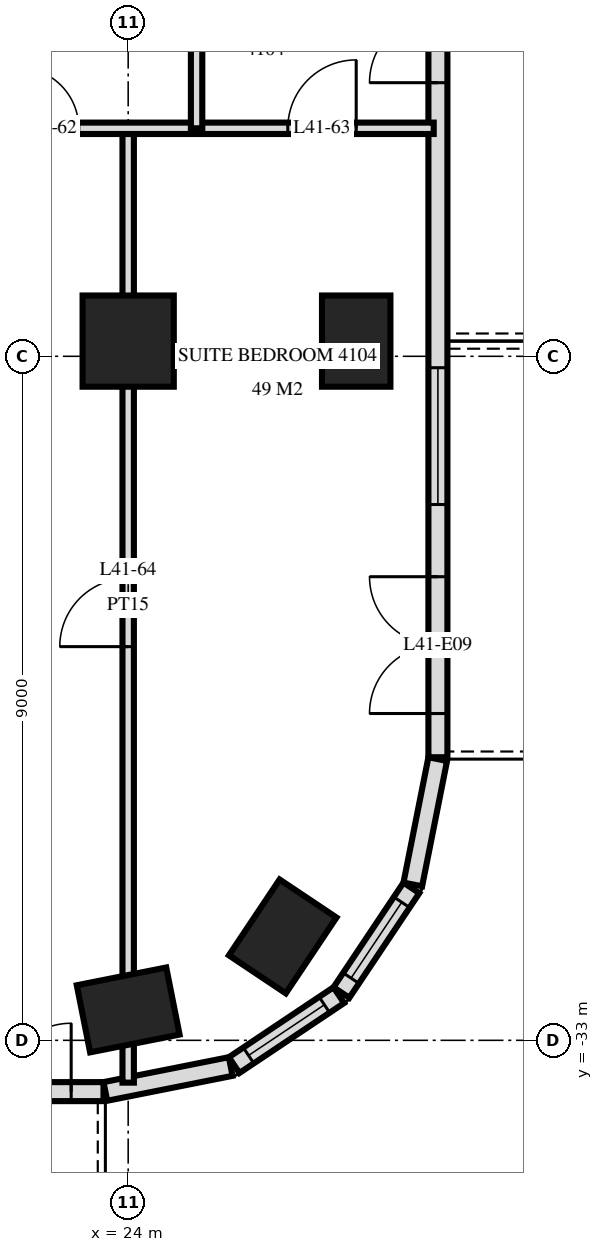
"""IFC4 building model, lengths in metres.
Left out: names, types, materials, properties, quantities, classifications, styles, units other than length and angle.
Written with IfcOpenShell. Run it as: python <this file> out.ifc"""

import sys

from ifc_helpers import new_model, si_unit, direction, frame, frame_2d, origin, origin_2d, place, context, subcontext, project, spatial, rectangle, extrude, element, fill, save


model = new_model("IFC4")
c1 = context("Model", 3, precision=1e-05, world=origin(), true_north=direction((0.0, 1.0)))
c2 = subcontext(c1, "Body", "Model", "MODEL_VIEW")
j1 = project(units=[si_unit("LENGTHUNIT", "METRE"), si_unit("PLANEANGLEUNIT", "RADIAN")], contexts=[c1])
p1 = place(None, origin())
s1 = spatial("IfcSite", under=j1, at=p1, CompositionType="ELEMENT")
p2 = place(p1, origin())
s2 = spatial("IfcBuilding", under=s1, at=p2, CompositionType="ELEMENT")
p3 = place(p2, frame((0.0, 0.0, 159.6)))
s3 = spatial("IfcBuildingStorey", under=s2, at=p3, CompositionType="ELEMENT", Elevation=159.6)
p4 = place(p3, frame((24.0, -32.6, 0.0), z_axis=(0.0, 0.0, 1.0), x_axis=(0.980792089743, 0.195056086032, 0.0)))
e1 = element("IfcColumn", 1, at=p4, inside=s3, PredefinedType="COLUMN", context=c2, shape_type="SweptSolid", body=[
    extrude(rectangle(XDim=1.2, YDim=0.9, at=origin_2d()), origin(), (0.0, 0.0, 1.0), 3.6),
])
p5 = place(p3, frame((24.0, -23.8, 0.0), z_axis=(0.0, 0.0, 1.0), x_axis=(1.0, 0.0, 0.0)))
e2 = element("IfcColumn", 2, at=p5, inside=s3, PredefinedType="COLUMN", context=c2, shape_type="SweptSolid", body=[
    extrude(rectangle(XDim=1.2, YDim=1.2, at=origin_2d()), origin(), (0.0, 0.0, 1.0), 3.6),
])
for number, where, z_axis, x_axis in (
    (3, (26.033, -31.633, 0.0), (0.0, 0.0, 1.0), (0.556, 0.831, 0.0)),
    (4, (27.0, -23.8, 0.0), (0.0, 0.0, 1.0), (0.0, 1.0, 0.0)),
):
    element("IfcColumn", number, at=place(p3, frame(where, z_axis=z_axis, x_axis=x_axis)), inside=s3, PredefinedType="COLUMN", context=c2, shape_type="SweptSolid", body=[
        extrude(rectangle(XDim=1.2, YDim=0.9, at=origin_2d()), origin(), (0.0, 0.0, 1.0), 3.6),
    ])
p6 = place(p3, frame((-23.675, -33.675, 0.0), z_axis=(0.0, 0.0, 1.0), x_axis=(1.0, 0.0, 0.0)))
e5 = element("IfcWall", 5, at=p6, inside=s3, PredefinedType="SOLIDWALL", context=c2, shape_type="SweptSolid", body=[
    extrude(rectangle(XDim=47.351, YDim=0.25, at=frame_2d((23.675, 0.0))), origin(), (0.0, 0.0, 1.0), 3.32),
])
p7 = place(p6, frame((0.575, 0.0, 0.0)))
e6 = element("IfcOpeningElement", 6, at=p7, cuts=e5, PredefinedType="OPENING", context=c2, shape_type="SweptSolid", body=[
    extrude(rectangle(XDim=1.8, YDim=2.4, at=frame_2d((0.9, 1.2))), frame((0.0, 0.135, 0.0), z_axis=(0.0, -1.0, 0.0), x_axis=(1.0, 0.0, 0.0)), (0.0, 0.0, 1.0), 0.27),
])
p8 = place(p6, frame((3.425, 0.0, 0.3)))
e7 = element("IfcOpeningElement", 7, at=p8, cuts=e5, PredefinedType="OPENING", context=c2, shape_type="SweptSolid", body=[
    extrude(rectangle(XDim=1.8, YDim=2.1, at=frame_2d((0.9, 1.05))), frame((0.0, 0.135, 0.0), z_axis=(0.0, -1.0, 0.0), x_axis=(1.0, 0.0, 0.0)), (0.0, 0.0, 1.0), 0.27),
])
p9 = place(p6, frame((5.975, 0.0, 0.3)))
e8 = element("IfcOpeningElement", 8, at=p9, cuts=e5, PredefinedType="OPENING", context=c2, shape_type="SweptSolid", body=[
    extrude(rectangle(XDim=2.4, YDim=2.1, at=frame_2d((1.2, 1.05))), frame((0.0, 0.135, 0.0), z_axis=(0.0, -1.0, 0.0), x_axis=(1.0, 0.0, 0.0)), (0.0, 0.0, 1.0), 0.27),
])
p10 = place(p6, frame((9.275, 0.0, 0.0)))
e9 = element("IfcOpeningElement", 9, at=p10, cuts=e5, PredefinedType="OPENING", context=c2, shape_type="SweptSolid", body=[
    extrude(rectangle(XDim=1.8, YDim=2.4, at=frame_2d((0.9, 1.2))), frame((0.0, 0.135, 0.0), z_axis=(0.0, -1.0, 0.0), x_axis=(1.0, 0.0, 0.0)), (0.0, 0.0, 1.0), 0.27),
])
p11 = place(p6, frame((12.275, 0.0, 0.0)))
e10 = element("IfcOpeningElement", 10, at=p11, cuts=e5, PredefinedType="OPENING", context=c2, shape_type="SweptSolid", body=[
    extrude(rectangle(XDim=1.8, YDim=2.4, at=frame_2d((0.9, 1.2))), frame((0.0, 0.135, 0.0), z_axis=(0.0, -1.0, 0.0), x_axis=(1.0, 0.0, 0.0)), (0.0, 0.0, 1.0), 0.27),
])
p12 = place(p6, frame((14.975, 0.0, 0.3)))
e11 = element("IfcOpeningElement", 11, at=p12, cuts=e5, PredefinedType="OPENING", context=c2, shape_type="SweptSolid", body=[
    extrude(rectangle(XDim=2.4, YDim=2.1, at=frame_2d((1.2, 1.05))), frame((0.0, 0.135, 0.0), z_axis=(0.0, -1.0, 0.0), x_axis=(1.0, 0.0, 0.0)), (0.0, 0.0, 1.0), 0.27),
])
p13 = place(p6, frame((17.975, 0.0, 0.3)))
e12 = element("IfcOpeningElement", 12, at=p13, cuts=e5, PredefinedType="OPENING", context=c2, shape_type="SweptSolid", body=[
    extrude(rectangle(XDim=2.4, YDim=2.1, at=frame_2d((1.2, 1.05))), frame((0.0, 0.135, 0.0), z_axis=(0.0, -1.0, 0.0), x_axis=(1.0, 0.0, 0.0)), (0.0, 0.0, 1.0), 0.27),
])
p14 = place(p6, frame((21.275, 0.0, 0.0)))
e13 = element("IfcOpeningElement", 13, at=p14, cuts=e5, PredefinedType="OPENING", context=c2, shape_type="SweptSolid", body=[
    extrude(rectangle(XDim=1.8, YDim=2.4, at=frame_2d((0.9, 1.2))), frame((0.0, 0.135, 0.0), z_axis=(0.0, -1.0, 0.0), x_axis=(1.0, 0.0, 0.0)), (0.0, 0.0, 1.0), 0.27),
])
p15 = place(p6, frame((24.275, 0.0, 0.0)))
e14 = element("IfcOpeningElement", 14, at=p15, cuts=e5, PredefinedType="OPENING", context=c2, shape_type="SweptSolid", body=[
    extrude(rectangle(XDim=1.8, YDim=2.4, at=frame_2d((0.9, 1.2))), frame((0.0, 0.135, 0.0), z_axis=(0.0, -1.0, 0.0), x_axis=(1.0, 0.0, 0.0)), (0.0, 0.0, 1.0), 0.27),
])
p16 = place(p6, frame((26.975, 0.0, 0.3)))
e15 = element("IfcOpeningElement", 15, at=p16, cuts=e5, PredefinedType="OPENING", context=c2, shape_type="SweptSolid", body=[
    extrude(rectangle(XDim=2.4, YDim=2.1, at=frame_2d((1.2, 1.05))), frame((0.0, 0.135, 0.0), z_axis=(0.0, -1.0, 0.0), x_axis=(1.0, 0.0, 0.0)), (0.0, 0.0, 1.0), 0.27),
])
p17 = place(p6, frame((30.275, 0.0, 0.0)))
e16 = element("IfcOpeningElement", 16, at=p17, cuts=e5, PredefinedType="OPENING", context=c2, shape_type="SweptSolid", body=[
    extrude(rectangle(XDim=1.8, YDim=2.4, at=frame_2d((0.9, 1.2))), frame((0.0, 0.135, 0.0), z_axis=(0.0, -1.0, 0.0), x_axis=(1.0, 0.0, 0.0)), (0.0, 0.0, 1.0), 0.27),
])
p18 = place(p6, frame((32.975, 0.0, 0.3)))
e17 = element("IfcOpeningElement", 17, at=p18, cuts=e5, PredefinedType="OPENING", context=c2, shape_type="SweptSolid", body=[
    extrude(rectangle(XDim=2.4, YDim=2.1, at=frame_2d((1.2, 1.05))), frame((0.0, 0.135, 0.0), z_axis=(0.0, -1.0, 0.0), x_axis=(1.0, 0.0, 0.0)), (0.0, 0.0, 1.0), 0.27),
])
p19 = place(p6, frame((36.275, 0.0, 0.0)))
e18 = element("IfcOpeningElement", 18, at=p19, cuts=e5, PredefinedType="OPENING", context=c2, shape_type="SweptSolid", body=[
    extrude(rectangle(XDim=1.8, YDim=2.4, at=frame_2d((0.9, 1.2))), frame((0.0, 0.135, 0.0), z_axis=(0.0, -1.0, 0.0), x_axis=(1.0, 0.0, 0.0)), (0.0, 0.0, 1.0), 0.27),
])
p20 = place(p6, frame((38.975, 0.0, 0.3)))
e19 = element("IfcOpeningElement", 19, at=p20, cuts=e5, PredefinedType="OPENING", context=c2, shape_type="SweptSolid", body=[
    extrude(rectangle(XDim=2.4, YDim=2.1, at=frame_2d((1.2, 1.05))), frame((0.0, 0.135, 0.0), z_axis=(0.0, -1.0, 0.0), x_axis=(1.0, 0.0, 0.0)), (0.0, 0.0, 1.0), 0.27),
])
p21 = place(p6, frame((41.975, 0.0, 0.3)))
e20 = element("IfcOpeningElement", 20, at=p21, cuts=e5, PredefinedType="OPENING", context=c2, shape_type="SweptSolid", body=[
    extrude(rectangle(XDim=2.4, YDim=2.1, at=frame_2d((1.2, 1.05))), frame((0.0, 0.135, 0.0), z_axis=(0.0, -1.0, 0.0), x_axis=(1.0, 0.0, 0.0)), (0.0, 0.0, 1.0), 0.27),
])
p22 = place(p6, frame((45.125, 0.0, 0.0)))
e21 = element("IfcOpeningElement", 21, at=p22, cuts=e5, PredefinedType="OPENING", context=c2, shape_type="SweptSolid", body=[
    extrude(rectangle(XDim=1.8, YDim=2.4, at=frame_2d((0.9, 1.2))), frame((0.0, 0.135, 0.0), z_axis=(0.0, -1.0, 0.0), x_axis=(1.0, 0.0, 0.0)), (0.0, 0.0, 1.0), 0.27),
])
p23 = place(p3, frame((23.7, -33.673, 0.0), z_axis=(0.0, 0.0, 1.0), x_axis=(0.980775640221, 0.19513878023, 0.0)))
e22 = element("IfcWall", 22, at=p23, inside=s3, PredefinedType="SOLIDWALL", context=c2, shape_type="SweptSolid", body=[
    extrude(rectangle(XDim=1.681, YDim=0.25, at=frame_2d((0.841, 0.0))), origin(), (0.0, 0.0, 1.0), 3.32),
])
p24 = place(p3, frame((25.394, -33.326, 0.0), z_axis=(0.0, 0.0, 1.0), x_axis=(0.831482937015, 0.55555029066, 0.0)))
e23 = element("IfcWall", 23, at=p24, inside=s3, PredefinedType="SOLIDWALL", context=c2, shape_type="SweptSolid", body=[
    extrude(rectangle(XDim=1.656, YDim=0.25, at=frame_2d((0.828, 0.0))), origin(), (0.0, 0.0, 1.0), 3.32),
])
p25 = place(p24, frame((0.228, 0.0, 0.9)))
e24 = element("IfcOpeningElement", 24, at=p25, cuts=e23, PredefinedType="OPENING", context=c2, shape_type="SweptSolid", body=[
    extrude(rectangle(XDim=1.2, YDim=1.5, at=frame_2d((0.6, 0.75))), frame((0.0, 0.135, 0.0), z_axis=(0.0, -1.0, 0.0), x_axis=(1.0, 0.0, 0.0)), (0.0, 0.0, 1.0), 0.27),
])
p26 = place(p3, frame((26.806, -32.371, 0.0), z_axis=(0.0, 0.0, 1.0), x_axis=(0.55555029066, 0.831482937015, 0.0)))
e25 = element("IfcWall", 25, at=p26, inside=s3, PredefinedType="SOLIDWALL", context=c2, shape_type="SweptSolid", body=[
    extrude(rectangle(XDim=1.656, YDim=0.25, at=frame_2d((0.828, 0.0))), origin(), (0.0, 0.0, 1.0), 3.32),
])
p27 = place(p26, frame((0.228, 0.0, 0.9)))
e26 = element("IfcOpeningElement", 26, at=p27, cuts=e25, PredefinedType="OPENING", context=c2, shape_type="SweptSolid", body=[
    extrude(rectangle(XDim=1.2, YDim=1.5, at=frame_2d((0.6, 0.75))), frame((0.0, 0.135, 0.0), z_axis=(0.0, -1.0, 0.0), x_axis=(1.0, 0.0, 0.0)), (0.0, 0.0, 1.0), 0.27),
])
p28 = place(p3, frame((27.745, -30.949, 0.0), z_axis=(0.0, 0.0, 1.0), x_axis=(0.194999110559, 0.980803419081, 0.0)))
e27 = element("IfcWall", 27, at=p28, inside=s3, PredefinedType="SOLIDWALL", context=c2, shape_type="SweptSolid", body=[
    extrude(rectangle(XDim=1.681, YDim=0.25, at=frame_2d((0.841, 0.0))), origin(), (0.0, 0.0, 1.0), 3.32),
])
p29 = place(p3, frame((28.075, -29.275, 0.0), z_axis=(0.0, 0.0, 1.0), x_axis=(0.0, 1.0, 0.0)))
e28 = element("IfcWall", 28, at=p29, inside=s3, PredefinedType="SOLIDWALL", context=c2, shape_type="SweptSolid", body=[
    extrude(rectangle(XDim=25.951, YDim=0.25, at=frame_2d((12.975, 0.0))), origin(), (0.0, 0.0, 1.0), 3.32),
])
p30 = place(p29, frame((0.575, 0.0, 0.0)))
e29 = element("IfcOpeningElement", 29, at=p30, cuts=e28, PredefinedType="OPENING", context=c2, shape_type="SweptSolid", body=[
    extrude(rectangle(XDim=1.8, YDim=2.4, at=frame_2d((0.9, 1.2))), frame((0.0, 0.135, 0.0), z_axis=(0.0, -1.0, 0.0), x_axis=(1.0, 0.0, 0.0)), (0.0, 0.0, 1.0), 0.27),
])
p31 = place(p29, frame((3.325, 0.0, 0.3)))
e30 = element("IfcOpeningElement", 30, at=p31, cuts=e28, PredefinedType="OPENING", context=c2, shape_type="SweptSolid", body=[
    extrude(rectangle(XDim=1.8, YDim=2.1, at=frame_2d((0.9, 1.05))), frame((0.0, 0.135, 0.0), z_axis=(0.0, -1.0, 0.0), x_axis=(1.0, 0.0, 0.0)), (0.0, 0.0, 1.0), 0.27),
])
p32 = place(p29, frame((8.875, 0.0, 0.0)))
e31 = element("IfcOpeningElement", 31, at=p32, cuts=e28, PredefinedType="OPENING", context=c2, shape_type="SweptSolid", body=[
    extrude(rectangle(XDim=1.8, YDim=2.4, at=frame_2d((0.9, 1.2))), frame((0.0, 0.135, 0.0), z_axis=(0.0, -1.0, 0.0), x_axis=(1.0, 0.0, 0.0)), (0.0, 0.0, 1.0), 0.27),
])
p33 = place(p29, frame((12.175, 0.0, 0.3)))
e32 = element("IfcOpeningElement", 32, at=p33, cuts=e28, PredefinedType="OPENING", context=c2, shape_type="SweptSolid", body=[
    extrude(rectangle(XDim=1.2, YDim=2.1, at=frame_2d((0.6, 1.05))), frame((0.0, 0.135, 0.0), z_axis=(0.0, -1.0, 0.0), x_axis=(1.0, 0.0, 0.0)), (0.0, 0.0, 1.0), 0.27),
])
p34 = place(p29, frame((17.5, 0.0, 0.0)))
e33 = element("IfcOpeningElement", 33, at=p34, cuts=e28, PredefinedType="OPENING", context=c2, shape_type="SweptSolid", body=[
    extrude(rectangle(XDim=1.8, YDim=2.4, at=frame_2d((0.9, 1.2))), frame((0.0, 0.135, 0.0), z_axis=(0.0, -1.0, 0.0), x_axis=(1.0, 0.0, 0.0)), (0.0, 0.0, 1.0), 0.27),
])
p35 = place(p3, frame((24.9, -21.0, 0.0), z_axis=(0.0, 0.0, 1.0), x_axis=(0.0, 1.0, 0.0)))
e34 = element("IfcWall", 34, at=p35, inside=s3, PredefinedType="PARTITIONING", context=c2, shape_type="SweptSolid", body=[
    extrude(rectangle(XDim=3.0, YDim=0.15, at=frame_2d((1.5, 0.0))), origin(), (0.0, 0.0, 1.0), 3.32),
])
p36 = place(p3, frame((24.0, -33.557, 0.0), z_axis=(0.0, 0.0, 1.0), x_axis=(0.0, 1.0, 0.0)))
e35 = element("IfcWall", 35, at=p36, inside=s3, PredefinedType="PARTITIONING", context=c2, shape_type="SweptSolid", body=[
    extrude(rectangle(XDim=12.557, YDim=0.15, at=frame_2d((6.278, 0.0))), origin(), (0.0, 0.0, 1.0), 3.32),
])
p37 = place(p36, frame((5.737, 0.0, 0.0)))
e36 = element("IfcOpeningElement", 36, at=p37, cuts=e35, PredefinedType="OPENING", context=c2, shape_type="SweptSolid", body=[
    extrude(rectangle(XDim=0.9, YDim=2.1, at=frame_2d((0.45, 1.05))), frame((0.0, 0.085, 0.0), z_axis=(0.0, -1.0, 0.0), x_axis=(1.0, 0.0, 0.0)), (0.0, 0.0, 1.0), 0.17),
])
p38 = place(p3, frame((21.9, -21.0, 0.0), z_axis=(0.0, 0.0, 1.0), x_axis=(1.0, 0.0, 0.0)))
e37 = element("IfcWall", 37, at=p38, inside=s3, PredefinedType="PARTITIONING", context=c2, shape_type="SweptSolid", body=[
    extrude(rectangle(XDim=6.12, YDim=0.15, at=frame_2d((3.06, 0.0))), origin(), (0.0, 0.0, 1.0), 3.32),
])
p39 = place(p38, frame((0.65, 0.0, 0.0)))
e38 = element("IfcOpeningElement", 38, at=p39, cuts=e37, PredefinedType="OPENING", context=c2, shape_type="SweptSolid", body=[
    extrude(rectangle(XDim=0.8, YDim=2.1, at=frame_2d((0.4, 1.05))), frame((0.0, 0.085, 0.0), z_axis=(0.0, -1.0, 0.0), x_axis=(1.0, 0.0, 0.0)), (0.0, 0.0, 1.0), 0.17),
])
p40 = place(p38, frame((4.2, 0.0, 0.0)))
e39 = element("IfcOpeningElement", 39, at=p40, cuts=e37, PredefinedType="OPENING", context=c2, shape_type="SweptSolid", body=[
    extrude(rectangle(XDim=0.9, YDim=2.1, at=frame_2d((0.45, 1.05))), frame((0.0, 0.085, 0.0), z_axis=(0.0, -1.0, 0.0), x_axis=(1.0, 0.0, 0.0)), (0.0, 0.0, 1.0), 0.17),
])
p41 = place(p25, origin())
e40 = element("IfcWindow", 40, at=p41, inside=s3, PartitioningType="SINGLE_PANEL", PredefinedType="WINDOW", context=c2, shape_type="SweptSolid", body=[
    extrude(rectangle(XDim=1.2, YDim=1.5, at=frame_2d((0.6, 0.75))), frame((0.0, 0.03, 0.0), z_axis=(0.0, -1.0, 0.0), x_axis=(1.0, 0.0, 0.0)), (0.0, 0.0, 1.0), 0.06),
])
fill(e24, e40)
p42 = place(p27, origin())
e41 = element("IfcWindow", 41, at=p42, inside=s3, PartitioningType="SINGLE_PANEL", PredefinedType="WINDOW", context=c2, shape_type="SweptSolid", body=[
    extrude(rectangle(XDim=1.2, YDim=1.5, at=frame_2d((0.6, 0.75))), frame((0.0, 0.03, 0.0), z_axis=(0.0, -1.0, 0.0), x_axis=(1.0, 0.0, 0.0)), (0.0, 0.0, 1.0), 0.06),
])
fill(e26, e41)
p43 = place(p22, origin())
e42 = element("IfcDoor", 42, at=p43, inside=s3, OperationType="DOUBLE_DOOR_SINGLE_SWING", PredefinedType="DOOR", context=c2, shape_type="SweptSolid", body=[
    extrude(rectangle(XDim=1.8, YDim=2.4, at=frame_2d((0.9, 1.2))), frame((0.0, 0.025, 0.0), z_axis=(0.0, -1.0, 0.0), x_axis=(1.0, 0.0, 0.0)), (0.0, 0.0, 1.0), 0.05),
])
fill(e21, e42)
p44 = place(p30, origin())
e43 = element("IfcDoor", 43, at=p44, inside=s3, OperationType="DOUBLE_DOOR_SINGLE_SWING", PredefinedType="DOOR", context=c2, shape_type="SweptSolid", body=[
    extrude(rectangle(XDim=1.8, YDim=2.4, at=frame_2d((0.9, 1.2))), frame((0.0, 0.025, 0.0), z_axis=(0.0, -1.0, 0.0), x_axis=(1.0, 0.0, 0.0)), (0.0, 0.0, 1.0), 0.05),
])
fill(e29, e43)
p45 = place(p31, origin())
e44 = element("IfcWindow", 44, at=p45, inside=s3, PartitioningType="SINGLE_PANEL", PredefinedType="WINDOW", context=c2, shape_type="SweptSolid", body=[
    extrude(rectangle(XDim=1.8, YDim=2.1, at=frame_2d((0.9, 1.05))), frame((0.0, 0.03, 0.0), z_axis=(0.0, -1.0, 0.0), x_axis=(1.0, 0.0, 0.0)), (0.0, 0.0, 1.0), 0.06),
])
fill(e30, e44)
p46 = place(p32, origin())
e45 = element("IfcDoor", 45, at=p46, inside=s3, OperationType="DOUBLE_DOOR_SINGLE_SWING", PredefinedType="DOOR", context=c2, shape_type="SweptSolid", body=[
    extrude(rectangle(XDim=1.8, YDim=2.4, at=frame_2d((0.9, 1.2))), frame((0.0, 0.025, 0.0), z_axis=(0.0, -1.0, 0.0), x_axis=(1.0, 0.0, 0.0)), (0.0, 0.0, 1.0), 0.05),
])
fill(e31, e45)
p47 = place(p39, origin())
e46 = element("IfcDoor", 46, at=p47, inside=s3, OperationType="SINGLE_SWING_RIGHT", PredefinedType="DOOR", context=c2, shape_type="SweptSolid", body=[
    extrude(rectangle(XDim=0.8, YDim=2.1, at=frame_2d((0.4, 1.05))), frame((0.0, 0.025, 0.0), z_axis=(0.0, -1.0, 0.0), x_axis=(1.0, 0.0, 0.0)), (0.0, 0.0, 1.0), 0.05),
])
fill(e38, e46)
p48 = place(p40, origin())
e47 = element("IfcDoor", 47, at=p48, inside=s3, OperationType="SINGLE_SWING_LEFT", PredefinedType="DOOR", context=c2, shape_type="SweptSolid", body=[
    extrude(rectangle(XDim=0.9, YDim=2.1, at=frame_2d((0.45, 1.05))), frame((0.0, 0.025, 0.0), z_axis=(0.0, -1.0, 0.0), x_axis=(1.0, 0.0, 0.0)), (0.0, 0.0, 1.0), 0.05),
])
fill(e39, e47)
p49 = place(p37, origin())
e48 = element("IfcDoor", 48, at=p49, inside=s3, OperationType="SINGLE_SWING_RIGHT", PredefinedType="DOOR", context=c2, shape_type="SweptSolid", body=[
    extrude(rectangle(XDim=0.9, YDim=2.1, at=frame_2d((0.45, 1.05))), frame((0.0, 0.025, 0.0), z_axis=(0.0, -1.0, 0.0), x_axis=(1.0, 0.0, 0.0)), (0.0, 0.0, 1.0), 0.05),
])
fill(e36, e48)
save(model, sys.argv[1])
